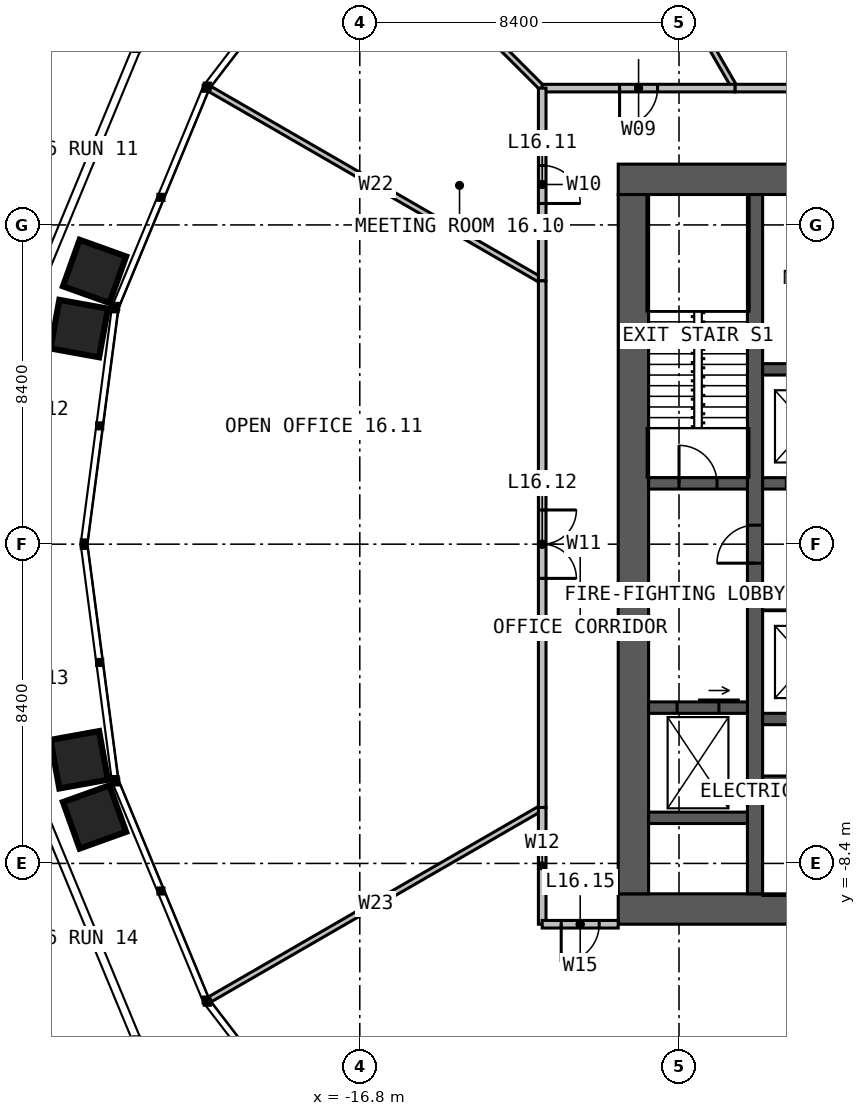
"""IFC4 building model, lengths in metres.
Left out: names, types, materials, properties, quantities, classifications, styles, units other than length and angle.
Written with IfcOpenShell. Run it as: python <this file> out.ifc"""

import sys

from ifc_helpers import new_model, si_unit, direction, frame, frame_2d, origin, place, context, subcontext, project, spatial, rectangle, extrude, element, fill, save


model = new_model("IFC4")
c1 = context("Model", 3, precision=1e-05, world=origin(), true_north=direction((0.0, 1.0)))
c2 = subcontext(c1, "Body", "Model", "MODEL_VIEW")
j1 = project(units=[si_unit("LENGTHUNIT", "METRE"), si_unit("PLANEANGLEUNIT", "RADIAN")], contexts=[c1])
p1 = place(None, origin())
s1 = spatial("IfcSite", under=j1, at=p1, CompositionType="ELEMENT")
p2 = place(p1, origin())
s2 = spatial("IfcBuilding", under=s1, at=p2, CompositionType="ELEMENT")
p3 = place(p2, frame((0.0, 0.0, 69.0)))
s3 = spatial("IfcBuildingStorey", under=s2, at=p3, CompositionType="ELEMENT", Elevation=69.0)
p4 = place(p3, frame((-10.0, 9.6, 0.0), z_axis=(0.0, 0.0, 1.0), x_axis=(1.0, 0.0, 0.0)))
e1 = element("IfcWall", 1, at=p4, inside=s3, PredefinedType="SOLIDWALL", context=c2, shape_type="SweptSolid", body=[
    extrude(rectangle(XDim=20.0, YDim=0.8, at=frame_2d((10.0, 0.0))), origin(), (0.0, 0.0, 1.0), 4.0),
])
p5 = place(p4, frame((9.4, 0.0, 0.0)))
e2 = element("IfcOpeningElement", 2, at=p5, cuts=e1, PredefinedType="OPENING", context=c2, shape_type="SweptSolid", body=[
    extrude(rectangle(XDim=1.2, YDim=2.2, at=frame_2d((0.6, 1.1))), frame((0.0, 0.41, 0.0), z_axis=(0.0, -1.0, 0.0), x_axis=(1.0, 0.0, 0.0)), (0.0, 0.0, 1.0), 0.82),
])
p6 = place(p3, frame((10.0, -9.6, 0.0), z_axis=(0.0, 0.0, 1.0), x_axis=(-1.0, 0.0, 0.0)))
e3 = element("IfcWall", 3, at=p6, inside=s3, PredefinedType="SOLIDWALL", context=c2, shape_type="SweptSolid", body=[
    extrude(rectangle(XDim=20.0, YDim=0.8, at=frame_2d((10.0, 0.0))), origin(), (0.0, 0.0, 1.0), 4.0),
])
p7 = place(p6, frame((6.875, 0.0, 0.0)))
e4 = element("IfcOpeningElement", 4, at=p7, cuts=e3, PredefinedType="OPENING", context=c2, shape_type="SweptSolid", body=[
    extrude(rectangle(XDim=1.2, YDim=2.2, at=frame_2d((0.6, 1.1))), frame((0.0, 0.41, 0.0), z_axis=(0.0, -1.0, 0.0), x_axis=(1.0, 0.0, 0.0)), (0.0, 0.0, 1.0), 0.82),
])
p8 = place(p3, frame((-9.6, 9.2, 0.0), z_axis=(0.0, 0.0, 1.0), x_axis=(0.0, -1.0, 0.0)))
e5 = element("IfcWall", 5, at=p8, inside=s3, PredefinedType="SOLIDWALL", context=c2, shape_type="SweptSolid", body=[
    extrude(rectangle(XDim=18.4, YDim=0.8, at=frame_2d((9.2, 0.0))), origin(), (0.0, 0.0, 1.0), 4.0),
])
p9 = place(p3, frame((-6.4, -9.2, 0.0), z_axis=(0.0, 0.0, 1.0), x_axis=(0.0, 1.0, 0.0)))
e6 = element("IfcWall", 6, at=p9, inside=s3, PredefinedType="SOLIDWALL", context=c2, shape_type="SweptSolid", body=[
    extrude(rectangle(XDim=18.4, YDim=0.4, at=frame_2d((9.2, 0.0))), origin(), (0.0, 0.0, 1.0), 4.0),
])
p10 = place(p9, frame((8.7, 0.0, 0.0)))
e7 = element("IfcOpeningElement", 7, at=p10, cuts=e6, PredefinedType="OPENING", context=c2, shape_type="SweptSolid", body=[
    extrude(rectangle(XDim=1.0, YDim=2.2, at=frame_2d((0.5, 1.1))), frame((0.0, 0.21, 0.0), z_axis=(0.0, -1.0, 0.0), x_axis=(1.0, 0.0, 0.0)), (0.0, 0.0, 1.0), 0.42),
])
p11 = place(p3, frame((-6.2, 1.6, 0.0), z_axis=(0.0, 0.0, 1.0), x_axis=(1.0, 0.0, 0.0)))
e8 = element("IfcWall", 8, at=p11, inside=s3, PredefinedType="SOLIDWALL", context=c2, shape_type="SweptSolid", body=[
    extrude(rectangle(XDim=4.85, YDim=0.3, at=frame_2d((2.425, 0.0))), origin(), (0.0, 0.0, 1.0), 4.0),
])
p12 = place(p11, frame((0.625, 0.0, 0.0)))
e9 = element("IfcOpeningElement", 9, at=p12, cuts=e8, PredefinedType="OPENING", context=c2, shape_type="SweptSolid", body=[
    extrude(rectangle(XDim=1.1, YDim=2.2, at=frame_2d((0.55, 1.1))), frame((0.0, 0.16, 0.0), z_axis=(0.0, -1.0, 0.0), x_axis=(1.0, 0.0, 0.0)), (0.0, 0.0, 1.0), 0.32),
])
p13 = place(p11, frame((3.15, 0.0, 0.0)))
e10 = element("IfcOpeningElement", 10, at=p13, cuts=e8, PredefinedType="OPENING", context=c2, shape_type="SweptSolid", body=[
    extrude(rectangle(XDim=1.1, YDim=2.2, at=frame_2d((0.55, 1.1))), frame((0.0, 0.16, 0.0), z_axis=(0.0, -1.0, 0.0), x_axis=(1.0, 0.0, 0.0)), (0.0, 0.0, 1.0), 0.32),
])
p14 = place(p3, frame((-6.2, 4.6, 0.0), z_axis=(0.0, 0.0, 1.0), x_axis=(1.0, 0.0, 0.0)))
e11 = element("IfcWall", 11, at=p14, inside=s3, PredefinedType="SOLIDWALL", context=c2, shape_type="SweptSolid", body=[
    extrude(rectangle(XDim=4.85, YDim=0.3, at=frame_2d((2.425, 0.0))), origin(), (0.0, 0.0, 1.0), 4.0),
])
for number, where, z_axis, x_axis in (
    (12, (-6.2, -1.6, 0.0), (0.0, 0.0, 1.0), (1.0, 0.0, 0.0)),
    (13, (-6.2, -4.6, 0.0), (0.0, 0.0, 1.0), (1.0, 0.0, 0.0)),
):
    element("IfcWall", number, at=place(p3, frame(where, z_axis=z_axis, x_axis=x_axis)), inside=s3, PredefinedType="SOLIDWALL", context=c2, shape_type="SweptSolid", body=[
        extrude(rectangle(XDim=7.4, YDim=0.3, at=frame_2d((3.7, 0.0))), origin(), (0.0, 0.0, 1.0), 4.0),
    ])
p15 = place(p3, frame((-6.2, -6.2, 0.0), z_axis=(0.0, 0.0, 1.0), x_axis=(1.0, 0.0, 0.0)))
e14 = element("IfcWall", 14, at=p15, inside=s3, PredefinedType="SOLIDWALL", context=c2, shape_type="SweptSolid", body=[
    extrude(rectangle(XDim=7.4, YDim=0.2, at=frame_2d((3.7, 0.0))), origin(), (0.0, 0.0, 1.0), 4.0),
])
p16 = place(p3, frame((-9.2, 1.6, 0.0), z_axis=(0.0, 0.0, 1.0), x_axis=(1.0, 0.0, 0.0)))
e15 = element("IfcWall", 15, at=p16, inside=s3, PredefinedType="SOLIDWALL", context=c2, shape_type="SweptSolid", body=[
    extrude(rectangle(XDim=2.6, YDim=0.3, at=frame_2d((1.3, 0.0))), origin(), (0.0, 0.0, 1.0), 4.0),
])
p17 = place(p16, frame((0.8, 0.0, 0.0)))
e16 = element("IfcOpeningElement", 16, at=p17, cuts=e15, PredefinedType="OPENING", context=c2, shape_type="SweptSolid", body=[
    extrude(rectangle(XDim=1.0, YDim=2.2, at=frame_2d((0.5, 1.1))), frame((0.0, 0.16, 0.0), z_axis=(0.0, -1.0, 0.0), x_axis=(1.0, 0.0, 0.0)), (0.0, 0.0, 1.0), 0.32),
])
p18 = place(p3, frame((-9.2, -4.3, 0.0), z_axis=(0.0, 0.0, 1.0), x_axis=(1.0, 0.0, 0.0)))
e17 = element("IfcWall", 17, at=p18, inside=s3, PredefinedType="SOLIDWALL", context=c2, shape_type="SweptSolid", body=[
    extrude(rectangle(XDim=2.6, YDim=0.3, at=frame_2d((1.3, 0.0))), origin(), (0.0, 0.0, 1.0), 4.0),
])
p19 = place(p18, frame((0.75, 0.0, 0.0)))
e18 = element("IfcOpeningElement", 18, at=p19, cuts=e17, PredefinedType="OPENING", context=c2, shape_type="SweptSolid", body=[
    extrude(rectangle(XDim=1.1, YDim=2.2, at=frame_2d((0.55, 1.1))), frame((0.0, 0.16, 0.0), z_axis=(0.0, -1.0, 0.0), x_axis=(1.0, 0.0, 0.0)), (0.0, 0.0, 1.0), 0.32),
])
p20 = place(p3, frame((-9.2, -7.2, 0.0), z_axis=(0.0, 0.0, 1.0), x_axis=(1.0, 0.0, 0.0)))
e19 = element("IfcWall", 19, at=p20, inside=s3, PredefinedType="SOLIDWALL", context=c2, shape_type="SweptSolid", body=[
    extrude(rectangle(XDim=2.6, YDim=0.3, at=frame_2d((1.3, 0.0))), origin(), (0.0, 0.0, 1.0), 4.0),
])
p21 = place(p3, frame((-6.928, 12.0, 0.0), z_axis=(0.0, 0.0, 1.0), x_axis=(-0.500002673408, 0.866023860286, 0.0)))
e20 = element("IfcWall", 20, at=p21, inside=s3, PredefinedType="PARTITIONING", context=c2, shape_type="SweptSolid", body=[
    extrude(rectangle(XDim=10.106, YDim=0.15, at=frame_2d((5.053, 0.0))), origin(), (0.0, 0.0, 1.0), 2.79),
])
p22 = place(p3, frame((-12.0, 12.0, 0.0), z_axis=(0.0, 0.0, 1.0), x_axis=(-0.707106781187, 0.707106781187, 0.0)))
e21 = element("IfcWall", 21, at=p22, inside=s3, PredefinedType="PARTITIONING", context=c2, shape_type="SweptSolid", body=[
    extrude(rectangle(XDim=6.992, YDim=0.15, at=frame_2d((3.496, 0.0))), origin(), (0.0, 0.0, 1.0), 2.79),
])
for number, where, z_axis, x_axis in (
    (22, (-12.0, 6.928, 0.0), (0.0, 0.0, 1.0), (-0.866, 0.5, 0.0)),
    (23, (-12.0, -6.928, 0.0), (0.0, 0.0, 1.0), (-0.866, -0.5, 0.0)),
):
    element("IfcWall", number, at=place(p3, frame(where, z_axis=z_axis, x_axis=x_axis)), inside=s3, PredefinedType="PARTITIONING", context=c2, shape_type="SweptSolid", body=[
        extrude(rectangle(XDim=10.106, YDim=0.15, at=frame_2d((5.053, 0.0))), origin(), (0.0, 0.0, 1.0), 2.79),
    ])
p23 = place(p3, frame((3.215, 12.0, 0.0), z_axis=(0.0, 0.0, 1.0), x_axis=(-1.0, 0.0, 0.0)))
e24 = element("IfcWall", 24, at=p23, inside=s3, PredefinedType="PARTITIONING", context=c2, shape_type="SweptSolid", body=[
    extrude(rectangle(XDim=10.144, YDim=0.2, at=frame_2d((5.072, 0.0))), origin(), (0.0, 0.0, 1.0), 3.8),
])
p24 = place(p23, frame((4.172, 0.0, 0.0)))
e25 = element("IfcOpeningElement", 25, at=p24, cuts=e24, PredefinedType="OPENING", context=c2, shape_type="SweptSolid", body=[
    extrude(rectangle(XDim=1.8, YDim=2.2, at=frame_2d((0.9, 1.1))), frame((0.0, 0.11, 0.0), z_axis=(0.0, -1.0, 0.0), x_axis=(1.0, 0.0, 0.0)), (0.0, 0.0, 1.0), 0.22),
])
p25 = place(p3, frame((-6.928, 12.0, 0.0), z_axis=(0.0, 0.0, 1.0), x_axis=(-1.0, 0.0, 0.0)))
e26 = element("IfcWall", 26, at=p25, inside=s3, PredefinedType="PARTITIONING", context=c2, shape_type="SweptSolid", body=[
    extrude(rectangle(XDim=5.072, YDim=0.2, at=frame_2d((2.536, 0.0))), origin(), (0.0, 0.0, 1.0), 3.8),
])
p26 = place(p25, frame((2.036, 0.0, 0.0)))
e27 = element("IfcOpeningElement", 27, at=p26, cuts=e26, PredefinedType="OPENING", context=c2, shape_type="SweptSolid", body=[
    extrude(rectangle(XDim=1.0, YDim=2.2, at=frame_2d((0.5, 1.1))), frame((0.0, 0.11, 0.0), z_axis=(0.0, -1.0, 0.0), x_axis=(1.0, 0.0, 0.0)), (0.0, 0.0, 1.0), 0.22),
])
p27 = place(p3, frame((-12.0, 12.0, 0.0), z_axis=(0.0, 0.0, 1.0), x_axis=(0.0, -1.0, 0.0)))
e28 = element("IfcWall", 28, at=p27, inside=s3, PredefinedType="PARTITIONING", context=c2, shape_type="SweptSolid", body=[
    extrude(rectangle(XDim=5.072, YDim=0.2, at=frame_2d((2.536, 0.0))), origin(), (0.0, 0.0, 1.0), 3.8),
])
p28 = place(p27, frame((2.036, 0.0, 0.0)))
e29 = element("IfcOpeningElement", 29, at=p28, cuts=e28, PredefinedType="OPENING", context=c2, shape_type="SweptSolid", body=[
    extrude(rectangle(XDim=1.0, YDim=2.2, at=frame_2d((0.5, 1.1))), frame((0.0, 0.11, 0.0), z_axis=(0.0, -1.0, 0.0), x_axis=(1.0, 0.0, 0.0)), (0.0, 0.0, 1.0), 0.22),
])
p29 = place(p3, frame((-12.0, 6.928, 0.0), z_axis=(0.0, 0.0, 1.0), x_axis=(0.0, -1.0, 0.0)))
e30 = element("IfcWall", 30, at=p29, inside=s3, PredefinedType="PARTITIONING", context=c2, shape_type="SweptSolid", body=[
    extrude(rectangle(XDim=13.856, YDim=0.2, at=frame_2d((6.928, 0.0))), origin(), (0.0, 0.0, 1.0), 3.8),
])
p30 = place(p29, frame((6.028, 0.0, 0.0)))
e31 = element("IfcOpeningElement", 31, at=p30, cuts=e30, PredefinedType="OPENING", context=c2, shape_type="SweptSolid", body=[
    extrude(rectangle(XDim=1.8, YDim=2.2, at=frame_2d((0.9, 1.1))), frame((0.0, 0.11, 0.0), z_axis=(0.0, -1.0, 0.0), x_axis=(1.0, 0.0, 0.0)), (0.0, 0.0, 1.0), 0.22),
])
p31 = place(p3, frame((-12.0, -6.928, 0.0), z_axis=(0.0, 0.0, 1.0), x_axis=(0.0, -1.0, 0.0)))
e32 = element("IfcWall", 32, at=p31, inside=s3, PredefinedType="PARTITIONING", context=c2, shape_type="SweptSolid", body=[
    extrude(rectangle(XDim=3.072, YDim=0.2, at=frame_2d((1.536, 0.0))), origin(), (0.0, 0.0, 1.0), 3.8),
])
p32 = place(p3, frame((-10.0, -10.0, 0.0), z_axis=(0.0, 0.0, 1.0), x_axis=(-1.0, 0.0, 0.0)))
e33 = element("IfcWall", 33, at=p32, inside=s3, PredefinedType="PARTITIONING", context=c2, shape_type="SweptSolid", body=[
    extrude(rectangle(XDim=2.0, YDim=0.2, at=frame_2d((1.0, 0.0))), origin(), (0.0, 0.0, 1.0), 3.8),
])
p33 = place(p32, frame((0.5, 0.0, 0.0)))
e34 = element("IfcOpeningElement", 34, at=p33, cuts=e33, PredefinedType="OPENING", context=c2, shape_type="SweptSolid", body=[
    extrude(rectangle(XDim=1.0, YDim=2.2, at=frame_2d((0.5, 1.1))), frame((0.0, 0.11, 0.0), z_axis=(0.0, -1.0, 0.0), x_axis=(1.0, 0.0, 0.0)), (0.0, 0.0, 1.0), 0.22),
])
p34 = place(p10, origin())
e35 = element("IfcDoor", 35, at=p34, inside=s3, OperationType="SINGLE_SWING_LEFT", PredefinedType="DOOR", context=c2, shape_type="SweptSolid", body=[
    extrude(rectangle(XDim=1.0, YDim=2.2, at=frame_2d((0.5, 1.1))), frame((0.0, 0.025, 0.0), z_axis=(0.0, -1.0, 0.0), x_axis=(1.0, 0.0, 0.0)), (0.0, 0.0, 1.0), 0.05),
])
fill(e7, e35)
p35 = place(p17, origin())
e36 = element("IfcDoor", 36, at=p35, inside=s3, OperationType="SINGLE_SWING_LEFT", PredefinedType="DOOR", context=c2, shape_type="SweptSolid", body=[
    extrude(rectangle(XDim=1.0, YDim=2.2, at=frame_2d((0.5, 1.1))), frame((0.0, 0.025, 0.0), z_axis=(0.0, -1.0, 0.0), x_axis=(1.0, 0.0, 0.0)), (0.0, 0.0, 1.0), 0.05),
])
fill(e16, e36)
p36 = place(p19, origin())
e37 = element("IfcDoor", 37, at=p36, inside=s3, OperationType="SLIDING_TO_LEFT", PredefinedType="DOOR", context=c2, shape_type="SweptSolid", body=[
    extrude(rectangle(XDim=1.1, YDim=2.2, at=frame_2d((0.55, 1.1))), frame((0.0, 0.025, 0.0), z_axis=(0.0, -1.0, 0.0), x_axis=(1.0, 0.0, 0.0)), (0.0, 0.0, 1.0), 0.05),
])
fill(e18, e37)
p37 = place(p26, origin())
e38 = element("IfcDoor", 38, at=p37, inside=s3, OperationType="SINGLE_SWING_RIGHT", PredefinedType="DOOR", context=c2, shape_type="SweptSolid", body=[
    extrude(rectangle(XDim=1.0, YDim=2.2, at=frame_2d((0.5, 1.1))), frame((0.0, 0.025, 0.0), z_axis=(0.0, -1.0, 0.0), x_axis=(1.0, 0.0, 0.0)), (0.0, 0.0, 1.0), 0.05),
])
fill(e27, e38)
p38 = place(p28, origin())
e39 = element("IfcDoor", 39, at=p38, inside=s3, OperationType="SINGLE_SWING_RIGHT", PredefinedType="DOOR", context=c2, shape_type="SweptSolid", body=[
    extrude(rectangle(XDim=1.0, YDim=2.2, at=frame_2d((0.5, 1.1))), frame((0.0, 0.025, 0.0), z_axis=(0.0, -1.0, 0.0), x_axis=(1.0, 0.0, 0.0)), (0.0, 0.0, 1.0), 0.05),
])
fill(e29, e39)
p39 = place(p30, origin())
e40 = element("IfcDoor", 40, at=p39, inside=s3, OperationType="DOUBLE_DOOR_SINGLE_SWING", PredefinedType="DOOR", context=c2, shape_type="SweptSolid", body=[
    extrude(rectangle(XDim=1.8, YDim=2.2, at=frame_2d((0.9, 1.1))), frame((0.0, 0.025, 0.0), z_axis=(0.0, -1.0, 0.0), x_axis=(1.0, 0.0, 0.0)), (0.0, 0.0, 1.0), 0.05),
])
fill(e31, e40)
p40 = place(p33, origin())
e41 = element("IfcDoor", 41, at=p40, inside=s3, OperationType="SINGLE_SWING_RIGHT", PredefinedType="DOOR", context=c2, shape_type="SweptSolid", body=[
    extrude(rectangle(XDim=1.0, YDim=2.2, at=frame_2d((0.5, 1.1))), frame((0.0, 0.025, 0.0), z_axis=(0.0, -1.0, 0.0), x_axis=(1.0, 0.0, 0.0)), (0.0, 0.0, 1.0), 0.05),
])
fill(e34, e41)
save(model, sys.argv[1])
